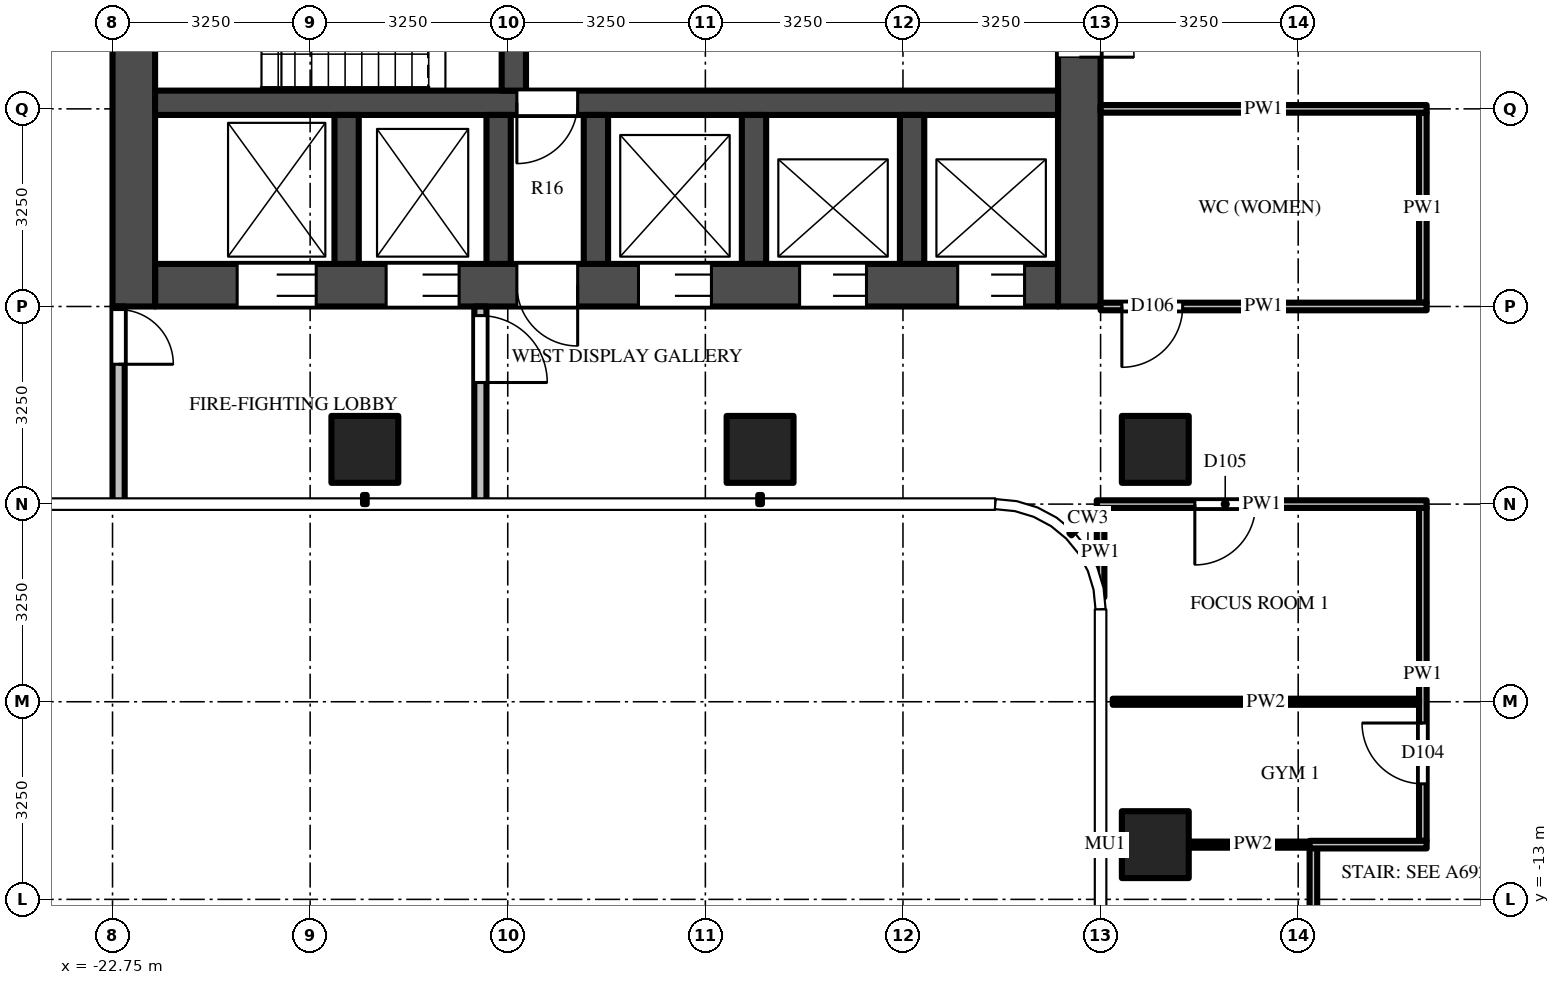
"""IFC4 building model, lengths in metres.
Left out: names, types, materials, properties, quantities, classifications, styles, units other than length and angle.
Written with IfcOpenShell. Run it as: python <this file> out.ifc"""

import sys

from ifc_helpers import new_model, si_unit, direction, frame, frame_2d, origin, origin_2d, place, context, subcontext, project, spatial, polyline, rectangle, outline, extrude, source, transform, mapped, element, fill, save


model = new_model("IFC4")
c1 = context("Model", 3, precision=1e-05, world=origin(), true_north=direction((0.0, 1.0)))
c2 = subcontext(c1, "Body", "Model", "MODEL_VIEW")
j1 = project(units=[si_unit("LENGTHUNIT", "METRE"), si_unit("PLANEANGLEUNIT", "RADIAN")], contexts=[c1])
p1 = place(None, origin())
s1 = spatial("IfcSite", under=j1, at=p1, CompositionType="ELEMENT")
p2 = place(p1, origin())
s2 = spatial("IfcBuilding", under=s1, at=p2, CompositionType="ELEMENT")
p3 = place(p2, frame((0.0, 0.0, 224.6)))
s3 = spatial("IfcBuildingStorey", under=s2, at=p3, CompositionType="ELEMENT", Elevation=224.6)
m1 = source(origin(), c2, "Body", "SweptSolid", [
    extrude(rectangle(XDim=1.1, YDim=1.1, at=origin_2d()), origin(), (0.0, 0.0, 1.0), 3.9),
])
for number, where, z_axis, x_axis in (
    (1, (-5.6, -5.6, 0.0), (0.0, 0.0, 1.0), (1.0, 0.0, 0.0)),
    (2, (-5.6, -12.1, 0.0), (0.0, 0.0, 1.0), (1.0, 0.0, 0.0)),
    (3, (-12.1, -5.6, 0.0), (0.0, 0.0, 1.0), (1.0, 0.0, 0.0)),
    (4, (-18.6, -5.6, 0.0), (0.0, 0.0, 1.0), (1.0, 0.0, 0.0)),
):
    element("IfcColumn", number, at=place(p3, frame(where, z_axis=z_axis, x_axis=x_axis)), inside=s3, PredefinedType="COLUMN", context=c2, shape_type="MappedRepresentation", body=[
        mapped(m1, transform((0.0, 0.0, 0.0))),
    ])
m2 = source(origin(), c2, "Body", "SweptSolid", [
    extrude(rectangle(XDim=14.85, YDim=0.7, at=frame_2d((7.425, 0.0))), origin(), (0.0, 0.0, 1.0), 3.7),
])
p4 = place(p3, frame((-7.2, -2.9, 0.0), z_axis=(0.0, 0.0, 1.0), x_axis=(-1.0, 0.0, 0.0)))
e5 = element("IfcWall", 5, at=p4, inside=s3, PredefinedType="SHEAR", context=c2, shape_type="MappedRepresentation", body=[
    mapped(m2, transform((0.0, 0.0, 0.0))),
])
m3 = source(origin(), c2, "Body", "SweptSolid", [
    extrude(rectangle(XDim=1.1, YDim=2.1, at=frame_2d((0.55, 1.05))), frame((0.0, 0.36, 0.0), z_axis=(0.0, -1.0, 0.0), x_axis=(1.0, 0.0, 0.0)), (0.0, 0.0, 1.0), 0.72),
])
p5 = place(p4, frame((0.55, 0.0, 0.0)))
e6 = element("IfcOpeningElement", 6, at=p5, cuts=e5, PredefinedType="OPENING", context=c2, shape_type="MappedRepresentation", body=[
    mapped(m3, transform((0.0, 0.0, 0.0))),
])
p6 = place(p4, frame((3.15, 0.0, 0.0)))
e7 = element("IfcOpeningElement", 7, at=p6, cuts=e5, PredefinedType="OPENING", context=c2, shape_type="MappedRepresentation", body=[
    mapped(m3, transform((0.0, 0.0, 0.0))),
])
m4 = source(origin(), c2, "Body", "SweptSolid", [
    extrude(rectangle(XDim=1.2, YDim=2.1, at=frame_2d((0.6, 1.05))), frame((0.0, 0.36, 0.0), z_axis=(0.0, -1.0, 0.0), x_axis=(1.0, 0.0, 0.0)), (0.0, 0.0, 1.0), 0.72),
])
p7 = place(p4, frame((5.7, 0.0, 0.0)))
e8 = element("IfcOpeningElement", 8, at=p7, cuts=e5, PredefinedType="OPENING", context=c2, shape_type="MappedRepresentation", body=[
    mapped(m4, transform((0.0, 0.0, 0.0))),
])
m5 = source(origin(), c2, "Body", "SweptSolid", [
    extrude(rectangle(XDim=1.3, YDim=2.1, at=frame_2d((0.65, 1.05))), frame((0.0, 0.36, 0.0), z_axis=(0.0, -1.0, 0.0), x_axis=(1.0, 0.0, 0.0)), (0.0, 0.0, 1.0), 0.72),
])
p8 = place(p4, frame((12.2, 0.0, 0.0)))
e9 = element("IfcOpeningElement", 9, at=p8, cuts=e5, PredefinedType="OPENING", context=c2, shape_type="MappedRepresentation", body=[
    mapped(m5, transform((0.0, 0.0, 0.0))),
])
p9 = place(p4, frame((9.85, 0.0, 0.0)))
e10 = element("IfcOpeningElement", 10, at=p9, cuts=e5, PredefinedType="OPENING", context=c2, shape_type="MappedRepresentation", body=[
    mapped(m4, transform((0.0, 0.0, 0.0))),
])
m6 = source(origin(), c2, "Body", "SweptSolid", [
    extrude(rectangle(XDim=1.0, YDim=2.1, at=frame_2d((0.5, 1.05))), frame((0.0, 0.36, 0.0), z_axis=(0.0, -1.0, 0.0), x_axis=(1.0, 0.0, 0.0)), (0.0, 0.0, 1.0), 0.72),
])
p10 = place(p4, frame((7.9, 0.0, 0.0)))
e11 = element("IfcOpeningElement", 11, at=p10, cuts=e5, PredefinedType="OPENING", context=c2, shape_type="MappedRepresentation", body=[
    mapped(m6, transform((0.0, 0.0, 0.0))),
])
m7 = source(origin(), c2, "Body", "SweptSolid", [
    extrude(rectangle(XDim=9.05, YDim=0.7, at=frame_2d((4.525, 0.0))), origin(), (0.0, 0.0, 1.0), 3.7),
])
p11 = place(p3, frame((-6.85, 5.8, 0.0), z_axis=(0.0, 0.0, 1.0), x_axis=(0.0, -1.0, 0.0)))
e12 = element("IfcWall", 12, at=p11, inside=s3, PredefinedType="SHEAR", context=c2, shape_type="MappedRepresentation", body=[
    mapped(m7, transform((0.0, 0.0, 0.0))),
])
m8 = source(origin(), c2, "Body", "SweptSolid", [
    extrude(rectangle(XDim=1.8, YDim=2.1, at=frame_2d((0.9, 1.05))), frame((0.0, 0.36, 0.0), z_axis=(0.0, -1.0, 0.0), x_axis=(1.0, 0.0, 0.0)), (0.0, 0.0, 1.0), 0.72),
])
p12 = place(p11, frame((3.15, 0.0, 0.0)))
e13 = element("IfcOpeningElement", 13, at=p12, cuts=e12, PredefinedType="OPENING", context=c2, shape_type="MappedRepresentation", body=[
    mapped(m8, transform((0.0, 0.0, 0.0))),
])
p13 = place(p3, frame((-22.4, 5.8, 0.0), z_axis=(0.0, 0.0, 1.0), x_axis=(0.0, -1.0, 0.0)))
e14 = element("IfcWall", 14, at=p13, inside=s3, PredefinedType="SHEAR", context=c2, shape_type="MappedRepresentation", body=[
    mapped(m7, transform((0.0, 0.0, 0.0))),
])
m9 = source(origin(), c2, "Body", "SweptSolid", [
    extrude(rectangle(XDim=14.85, YDim=0.4, at=frame_2d((7.425, 0.0))), origin(), (0.0, 0.0, 1.0), 3.7),
])
p14 = place(p3, frame((-7.2, 0.1, 0.0), z_axis=(0.0, 0.0, 1.0), x_axis=(-1.0, 0.0, 0.0)))
e15 = element("IfcWall", 15, at=p14, inside=s3, PredefinedType="SHEAR", context=c2, shape_type="MappedRepresentation", body=[
    mapped(m9, transform((0.0, 0.0, 0.0))),
])
m10 = source(origin(), c2, "Body", "SweptSolid", [
    extrude(rectangle(XDim=1.0, YDim=2.1, at=frame_2d((0.5, 1.05))), frame((0.0, 0.21, 0.0), z_axis=(0.0, -1.0, 0.0), x_axis=(1.0, 0.0, 0.0)), (0.0, 0.0, 1.0), 0.42),
])
p15 = place(p14, frame((7.9, 0.0, 0.0)))
e16 = element("IfcOpeningElement", 16, at=p15, cuts=e15, PredefinedType="OPENING", context=c2, shape_type="MappedRepresentation", body=[
    mapped(m10, transform((0.0, 0.0, 0.0))),
])
m11 = source(origin(), c2, "Body", "SweptSolid", [
    extrude(rectangle(XDim=5.5, YDim=0.4, at=frame_2d((2.75, 0.0))), origin(), (0.0, 0.0, 1.0), 3.7),
])
p16 = place(p3, frame((-16.15, 5.8, 0.0), z_axis=(0.0, 0.0, 1.0), x_axis=(0.0, -1.0, 0.0)))
e17 = element("IfcWall", 17, at=p16, inside=s3, PredefinedType="SHEAR", context=c2, shape_type="MappedRepresentation", body=[
    mapped(m11, transform((0.0, 0.0, 0.0))),
])
m12 = source(origin(), c2, "Body", "SweptSolid", [
    extrude(rectangle(XDim=1.1, YDim=2.1, at=frame_2d((0.55, 1.05))), frame((0.0, 0.21, 0.0), z_axis=(0.0, -1.0, 0.0), x_axis=(1.0, 0.0, 0.0)), (0.0, 0.0, 1.0), 0.42),
])
p17 = place(p16, frame((0.725, 0.0, 0.0)))
e18 = element("IfcOpeningElement", 18, at=p17, cuts=e17, PredefinedType="OPENING", context=c2, shape_type="MappedRepresentation", body=[
    mapped(m12, transform((0.0, 0.0, 0.0))),
])
p18 = place(p16, frame((3.675, 0.0, 0.0)))
e19 = element("IfcOpeningElement", 19, at=p18, cuts=e17, PredefinedType="OPENING", context=c2, shape_type="MappedRepresentation", body=[
    mapped(m12, transform((0.0, 0.0, 0.0))),
])
m13 = source(origin(), c2, "Body", "SweptSolid", [
    extrude(rectangle(XDim=2.45, YDim=0.4, at=frame_2d((1.225, 0.0))), origin(), (0.0, 0.0, 1.0), 3.7),
])
for number, where, z_axis, x_axis in (
    (20, (-9.6, -0.1, 0.0), (0.0, 0.0, 1.0), (0.0, -1.0, 0.0)),
    (21, (-12.2, -0.1, 0.0), (0.0, 0.0, 1.0), (0.0, -1.0, 0.0)),
    (22, (-14.8, -0.1, 0.0), (0.0, 0.0, 1.0), (0.0, -1.0, 0.0)),
    (23, (-16.4, -0.1, 0.0), (0.0, 0.0, 1.0), (0.0, -1.0, 0.0)),
    (24, (-18.9, -0.1, 0.0), (0.0, 0.0, 1.0), (0.0, -1.0, 0.0)),
):
    element("IfcWall", number, at=place(p3, frame(where, z_axis=z_axis, x_axis=x_axis)), inside=s3, PredefinedType="SHEAR", context=c2, shape_type="MappedRepresentation", body=[
        mapped(m13, transform((0.0, 0.0, 0.0))),
    ])
m14 = source(origin(), c2, "Body", "SweptSolid", [
    extrude(rectangle(XDim=3.25, YDim=0.2, at=frame_2d((1.625, 0.0))), origin(), (0.0, 0.0, 1.0), 3.7),
])
p19 = place(p3, frame((-16.7, -3.25, 0.0), z_axis=(0.0, 0.0, 1.0), x_axis=(0.0, -1.0, 0.0)))
e25 = element("IfcWall", 25, at=p19, inside=s3, PredefinedType="PARTITIONING", context=c2, shape_type="MappedRepresentation", body=[
    mapped(m14, transform((0.0, 0.0, 0.0))),
])
m15 = source(origin(), c2, "Body", "SweptSolid", [
    extrude(rectangle(XDim=1.1, YDim=2.1, at=frame_2d((0.55, 1.05))), frame((0.0, 0.11, 0.0), z_axis=(0.0, -1.0, 0.0), x_axis=(1.0, 0.0, 0.0)), (0.0, 0.0, 1.0), 0.22),
])
p20 = place(p19, frame((0.15, 0.0, 0.0)))
e26 = element("IfcOpeningElement", 26, at=p20, cuts=e25, PredefinedType="OPENING", context=c2, shape_type="MappedRepresentation", body=[
    mapped(m15, transform((0.0, 0.0, 0.0))),
])
p21 = place(p3, frame((-22.65, -3.25, 0.0), z_axis=(0.0, 0.0, 1.0), x_axis=(0.0, -1.0, 0.0)))
e27 = element("IfcWall", 27, at=p21, inside=s3, PredefinedType="PARTITIONING", context=c2, shape_type="MappedRepresentation", body=[
    mapped(m14, transform((0.0, 0.0, 0.0))),
])
m16 = source(origin(), c2, "Body", "SweptSolid", [
    extrude(rectangle(XDim=0.9, YDim=2.1, at=frame_2d((0.45, 1.05))), frame((0.0, 0.11, 0.0), z_axis=(0.0, -1.0, 0.0), x_axis=(1.0, 0.0, 0.0)), (0.0, 0.0, 1.0), 0.22),
])
p22 = place(p21, frame((0.05, 0.0, 0.0)))
e28 = element("IfcOpeningElement", 28, at=p22, cuts=e27, PredefinedType="OPENING", context=c2, shape_type="MappedRepresentation", body=[
    mapped(m16, transform((0.0, 0.0, 0.0))),
])
p23 = place(p3, origin())
e29 = element("IfcWall", 29, at=p23, inside=s3, PredefinedType="USERDEFINED", context=c2, shape_type="SweptSolid", body=[
    extrude(outline(polyline([(-8.889, -12.653), (-8.749, -11.719), (-8.686, -11.518), (-8.114, -11.698), (-8.163, -11.854), (-8.287, -12.687), (-8.257, -13.476), (-8.107, -14.169), (-8.693, -14.296), (-8.854, -13.552), (-8.889, -12.653)])), origin(), (0.0, 0.0, 1.0), 0.5),
])
m17 = source(origin(), c2, "Body", "SweptSolid", [
    extrude(rectangle(XDim=1.469, YDim=0.125, at=frame_2d((0.734, 0.0))), origin(), (0.0, 0.0, 1.0), 3.7),
])
p24 = place(p3, frame((-6.5, -6.562, 0.0), z_axis=(0.0, 0.0, 1.0), x_axis=(0.0, -1.0, 0.0)))
e30 = element("IfcWall", 30, at=p24, inside=s3, PredefinedType="PARTITIONING", context=c2, shape_type="MappedRepresentation", body=[
    mapped(m17, transform((0.0, 0.0, 0.0))),
])
m18 = source(origin(), c2, "Body", "SweptSolid", [
    extrude(rectangle(XDim=6.4, YDim=0.125, at=frame_2d((3.2, 0.0))), origin(), (0.0, 0.0, 1.0), 2.997),
])
p25 = place(p3, frame((-3.0, -18.55, 0.0), z_axis=(0.0, 0.0, 1.0), x_axis=(0.0, 1.0, 0.0)))
e31 = element("IfcWall", 31, at=p25, inside=s3, PredefinedType="PARTITIONING", context=c2, shape_type="MappedRepresentation", body=[
    mapped(m18, transform((0.0, 0.0, 0.0))),
])
m19 = source(origin(), c2, "Body", "SweptSolid", [
    extrude(rectangle(XDim=1.0, YDim=2.1, at=frame_2d((0.5, 1.05))), frame((0.0, 0.073, 0.0), z_axis=(0.0, -1.0, 0.0), x_axis=(1.0, 0.0, 0.0)), (0.0, 0.0, 1.0), 0.145),
])
p26 = place(p25, frame((0.3, 0.0, 0.0)))
e32 = element("IfcOpeningElement", 32, at=p26, cuts=e31, PredefinedType="OPENING", context=c2, shape_type="MappedRepresentation", body=[
    mapped(m19, transform((0.0, 0.0, 0.0))),
])
m20 = source(origin(), c2, "Body", "SweptSolid", [
    extrude(rectangle(XDim=3.125, YDim=0.125, at=frame_2d((1.562, 0.0))), origin(), (0.0, 0.0, 1.0), 3.068),
])
p27 = place(p3, frame((-1.2, -0.062, 0.0), z_axis=(0.0, 0.0, 1.0), x_axis=(0.0, -1.0, 0.0)))
e33 = element("IfcWall", 33, at=p27, inside=s3, PredefinedType="PARTITIONING", context=c2, shape_type="MappedRepresentation", body=[
    mapped(m20, transform((0.0, 0.0, 0.0))),
])
m21 = source(origin(), c2, "Body", "SweptSolid", [
    extrude(rectangle(XDim=5.475, YDim=0.125, at=frame_2d((2.738, 0.0))), origin(), (0.0, 0.0, 1.0), 2.997),
])
p28 = place(p3, frame((-1.2, -12.038, 0.0), z_axis=(0.0, 0.0, 1.0), x_axis=(0.0, 1.0, 0.0)))
e34 = element("IfcWall", 34, at=p28, inside=s3, PredefinedType="PARTITIONING", context=c2, shape_type="MappedRepresentation", body=[
    mapped(m21, transform((0.0, 0.0, 0.0))),
])
p29 = place(p28, frame((0.938, 0.0, 0.0)))
e35 = element("IfcOpeningElement", 35, at=p29, cuts=e34, PredefinedType="OPENING", context=c2, shape_type="MappedRepresentation", body=[
    mapped(m19, transform((0.0, 0.0, 0.0))),
])
m22 = source(origin(), c2, "Body", "SweptSolid", [
    extrude(rectangle(XDim=2.113, YDim=0.1, at=frame_2d((1.056, 0.0))), origin(), (0.0, 0.0, 1.0), 2.997),
])
p30 = place(p3, frame((-5.05, -12.1, 0.0), z_axis=(0.0, 0.0, 1.0), x_axis=(1.0, 0.0, 0.0)))
e36 = element("IfcWall", 36, at=p30, inside=s3, PredefinedType="PARTITIONING", context=c2, shape_type="MappedRepresentation", body=[
    mapped(m22, transform((0.0, 0.0, 0.0))),
])
m23 = source(origin(), c2, "Body", "SweptSolid", [
    extrude(rectangle(XDim=1.925, YDim=0.125, at=frame_2d((0.962, 0.0))), origin(), (0.0, 0.0, 1.0), 2.997),
])
p31 = place(p3, frame((-3.062, -12.1, 0.0), z_axis=(0.0, 0.0, 1.0), x_axis=(1.0, 0.0, 0.0)))
e37 = element("IfcWall", 37, at=p31, inside=s3, PredefinedType="PARTITIONING", context=c2, shape_type="MappedRepresentation", body=[
    mapped(m23, transform((0.0, 0.0, 0.0))),
])
m24 = source(origin(), c2, "Body", "SweptSolid", [
    extrude(rectangle(XDim=5.038, YDim=0.1, at=frame_2d((2.519, 0.0))), origin(), (0.0, 0.0, 1.0), 2.78),
])
p32 = place(p3, frame((-6.3, -9.75, 0.0), z_axis=(0.0, 0.0, 1.0), x_axis=(1.0, 0.0, 0.0)))
e38 = element("IfcWall", 38, at=p32, inside=s3, PredefinedType="PARTITIONING", context=c2, shape_type="MappedRepresentation", body=[
    mapped(m24, transform((0.0, 0.0, 0.0))),
])
m25 = source(origin(), c2, "Body", "SweptSolid", [
    extrude(rectangle(XDim=5.425, YDim=0.125, at=frame_2d((2.712, 0.0))), origin(), (0.0, 0.0, 1.0), 2.78),
])
p33 = place(p3, frame((-1.137, -6.5, 0.0), z_axis=(0.0, 0.0, 1.0), x_axis=(-1.0, 0.0, 0.0)))
e39 = element("IfcWall", 39, at=p33, inside=s3, PredefinedType="PARTITIONING", context=c2, shape_type="MappedRepresentation", body=[
    mapped(m25, transform((0.0, 0.0, 0.0))),
])
p34 = place(p33, frame((2.812, 0.0, 0.0)))
e40 = element("IfcOpeningElement", 40, at=p34, cuts=e39, PredefinedType="OPENING", context=c2, shape_type="MappedRepresentation", body=[
    mapped(m19, transform((0.0, 0.0, 0.0))),
])
m26 = source(origin(), c2, "Body", "SweptSolid", [
    extrude(rectangle(XDim=5.363, YDim=0.125, at=frame_2d((2.681, 0.0))), origin(), (0.0, 0.0, 1.0), 2.997),
])
p35 = place(p3, frame((-1.137, -3.25, 0.0), z_axis=(0.0, 0.0, 1.0), x_axis=(-1.0, 0.0, 0.0)))
e41 = element("IfcWall", 41, at=p35, inside=s3, PredefinedType="PARTITIONING", context=c2, shape_type="MappedRepresentation", body=[
    mapped(m26, transform((0.0, 0.0, 0.0))),
])
p36 = place(p35, frame((4.012, 0.0, 0.0)))
e42 = element("IfcOpeningElement", 42, at=p36, cuts=e41, PredefinedType="OPENING", context=c2, shape_type="MappedRepresentation", body=[
    mapped(m19, transform((0.0, 0.0, 0.0))),
])
p37 = place(p3, frame((-1.137, 0.0, 0.0), z_axis=(0.0, 0.0, 1.0), x_axis=(-1.0, 0.0, 0.0)))
e43 = element("IfcWall", 43, at=p37, inside=s3, PredefinedType="PARTITIONING", context=c2, shape_type="MappedRepresentation", body=[
    mapped(m26, transform((0.0, 0.0, 0.0))),
])
m27 = source(origin(), c2, "Body", "SweptSolid", [
    extrude(rectangle(XDim=1.1, YDim=2.1, at=frame_2d((0.55, 1.05))), frame((0.0, -0.275, 0.0), z_axis=(0.0, -1.0, 0.0), x_axis=(1.0, 0.0, 0.0)), (0.0, 0.0, 1.0), 0.05),
])
p38 = place(p5, origin())
e44 = element("IfcDoor", 44, at=p38, inside=s3, OperationType="DOUBLE_DOOR_SLIDING", PredefinedType="DOOR", context=c2, shape_type="MappedRepresentation", body=[
    mapped(m27, transform((0.0, 0.0, 0.0))),
])
fill(e6, e44)
p39 = place(p6, origin())
e45 = element("IfcDoor", 45, at=p39, inside=s3, OperationType="DOUBLE_DOOR_SLIDING", PredefinedType="DOOR", context=c2, shape_type="MappedRepresentation", body=[
    mapped(m27, transform((0.0, 0.0, 0.0))),
])
fill(e7, e45)
m28 = source(origin(), c2, "Body", "SweptSolid", [
    extrude(rectangle(XDim=1.2, YDim=2.1, at=frame_2d((0.6, 1.05))), frame((0.0, -0.275, 0.0), z_axis=(0.0, -1.0, 0.0), x_axis=(1.0, 0.0, 0.0)), (0.0, 0.0, 1.0), 0.05),
])
p40 = place(p7, origin())
e46 = element("IfcDoor", 46, at=p40, inside=s3, OperationType="DOUBLE_DOOR_SLIDING", PredefinedType="DOOR", context=c2, shape_type="MappedRepresentation", body=[
    mapped(m28, transform((0.0, 0.0, 0.0))),
])
fill(e8, e46)
m29 = source(origin(), c2, "Body", "SweptSolid", [
    extrude(rectangle(XDim=1.3, YDim=2.1, at=frame_2d((0.65, 1.05))), frame((0.0, -0.275, 0.0), z_axis=(0.0, -1.0, 0.0), x_axis=(1.0, 0.0, 0.0)), (0.0, 0.0, 1.0), 0.05),
])
p41 = place(p8, origin())
e47 = element("IfcDoor", 47, at=p41, inside=s3, OperationType="DOUBLE_DOOR_SLIDING", PredefinedType="DOOR", context=c2, shape_type="MappedRepresentation", body=[
    mapped(m29, transform((0.0, 0.0, 0.0))),
])
fill(e9, e47)
p42 = place(p9, origin())
e48 = element("IfcDoor", 48, at=p42, inside=s3, OperationType="DOUBLE_DOOR_SLIDING", PredefinedType="DOOR", context=c2, shape_type="MappedRepresentation", body=[
    mapped(m28, transform((0.0, 0.0, 0.0))),
])
fill(e10, e48)
m30 = source(origin(), c2, "Body", "SweptSolid", [
    extrude(rectangle(XDim=1.8, YDim=2.1, at=frame_2d((0.9, 1.05))), frame((0.0, -0.275, 0.0), z_axis=(0.0, -1.0, 0.0), x_axis=(1.0, 0.0, 0.0)), (0.0, 0.0, 1.0), 0.05),
])
p43 = place(p12, origin())
e49 = element("IfcDoor", 49, at=p43, inside=s3, OperationType="DOUBLE_DOOR_SINGLE_SWING", PredefinedType="DOOR", context=c2, shape_type="MappedRepresentation", body=[
    mapped(m30, transform((0.0, 0.0, 0.0))),
])
fill(e13, e49)
m31 = source(origin(), c2, "Body", "SweptSolid", [
    extrude(rectangle(XDim=1.0, YDim=2.1, at=frame_2d((0.5, 1.05))), frame((0.0, 0.025, 0.0), z_axis=(0.0, -1.0, 0.0), x_axis=(1.0, 0.0, 0.0)), (0.0, 0.0, 1.0), 0.05),
])
p44 = place(p15, origin())
e50 = element("IfcDoor", 50, at=p44, inside=s3, OperationType="SINGLE_SWING_RIGHT", PredefinedType="DOOR", context=c2, shape_type="MappedRepresentation", body=[
    mapped(m31, transform((0.0, 0.0, 0.0))),
])
fill(e16, e50)
m32 = source(origin(), c2, "Body", "SweptSolid", [
    extrude(rectangle(XDim=1.0, YDim=2.1, at=frame_2d((0.5, 1.05))), frame((0.0, -0.275, 0.0), z_axis=(0.0, -1.0, 0.0), x_axis=(1.0, 0.0, 0.0)), (0.0, 0.0, 1.0), 0.05),
])
p45 = place(p10, origin())
e51 = element("IfcDoor", 51, at=p45, inside=s3, OperationType="SINGLE_SWING_LEFT", PredefinedType="DOOR", context=c2, shape_type="MappedRepresentation", body=[
    mapped(m32, transform((0.0, 0.0, 0.0))),
])
fill(e11, e51)
m33 = source(origin(), c2, "Body", "SweptSolid", [
    extrude(rectangle(XDim=1.1, YDim=2.1, at=frame_2d((0.55, 1.05))), frame((0.0, 0.025, 0.0), z_axis=(0.0, -1.0, 0.0), x_axis=(1.0, 0.0, 0.0)), (0.0, 0.0, 1.0), 0.05),
])
p46 = place(p20, origin())
e52 = element("IfcDoor", 52, at=p46, inside=s3, OperationType="SINGLE_SWING_RIGHT", PredefinedType="DOOR", context=c2, shape_type="MappedRepresentation", body=[
    mapped(m33, transform((0.0, 0.0, 0.0))),
])
fill(e26, e52)
m34 = source(origin(), c2, "Body", "SweptSolid", [
    extrude(rectangle(XDim=0.9, YDim=2.1, at=frame_2d((0.45, 1.05))), frame((0.0, 0.025, 0.0), z_axis=(0.0, -1.0, 0.0), x_axis=(1.0, 0.0, 0.0)), (0.0, 0.0, 1.0), 0.05),
])
p47 = place(p22, origin())
e53 = element("IfcDoor", 53, at=p47, inside=s3, OperationType="SINGLE_SWING_RIGHT", PredefinedType="DOOR", context=c2, shape_type="MappedRepresentation", body=[
    mapped(m34, transform((0.0, 0.0, 0.0))),
])
fill(e28, e53)
p48 = place(p29, origin())
e54 = element("IfcDoor", 54, at=p48, inside=s3, OperationType="SINGLE_SWING_RIGHT", PredefinedType="DOOR", context=c2, shape_type="MappedRepresentation", body=[
    mapped(m31, transform((0.0, 0.0, 0.0))),
])
fill(e35, e54)
p49 = place(p34, origin())
e55 = element("IfcDoor", 55, at=p49, inside=s3, OperationType="SINGLE_SWING_RIGHT", PredefinedType="DOOR", context=c2, shape_type="MappedRepresentation", body=[
    mapped(m31, transform((0.0, 0.0, 0.0))),
])
fill(e40, e55)
p50 = place(p36, origin())
e56 = element("IfcDoor", 56, at=p50, inside=s3, OperationType="SINGLE_SWING_RIGHT", PredefinedType="DOOR", context=c2, shape_type="MappedRepresentation", body=[
    mapped(m31, transform((0.0, 0.0, 0.0))),
])
fill(e42, e56)
save(model, sys.argv[1])
